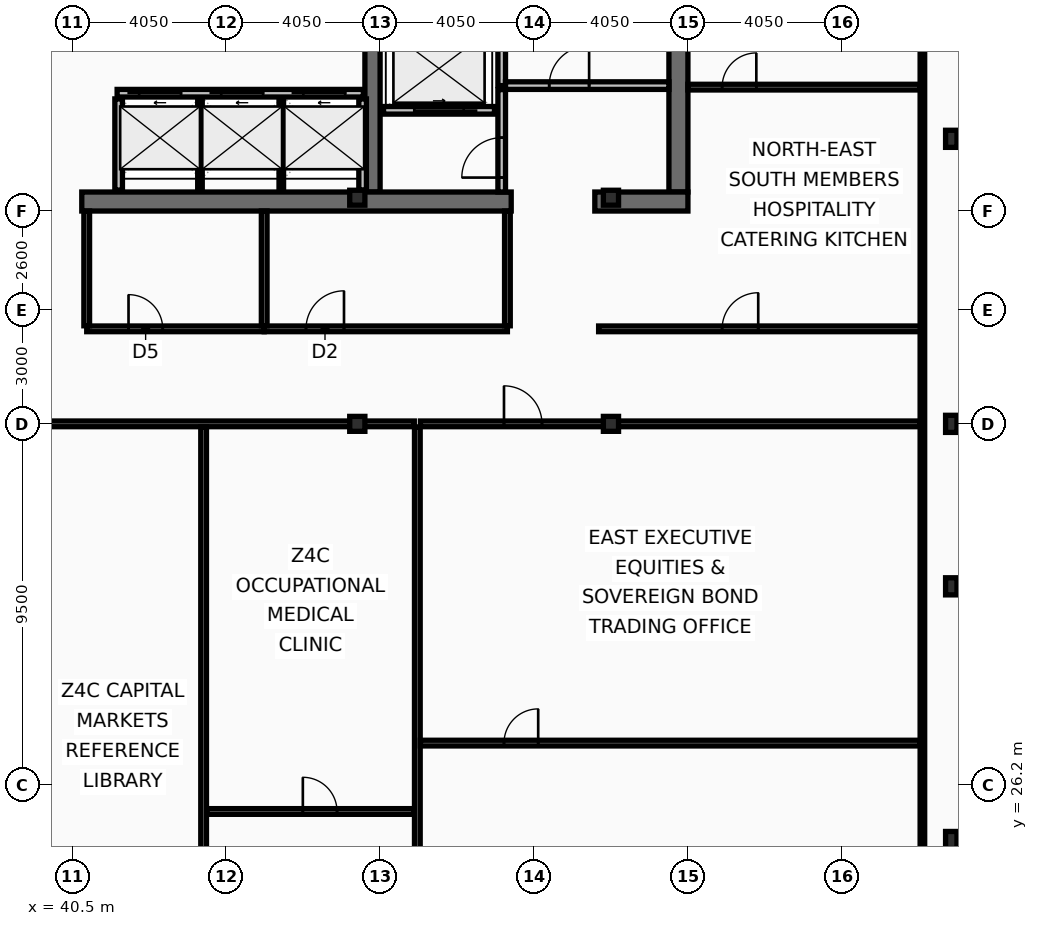
"""IFC4 building model, lengths in metres.
Left out: names, types, materials, properties, quantities, classifications, styles, units other than length and angle.
Written with IfcOpenShell. Run it as: python <this file> out.ifc"""

import sys

from ifc_helpers import new_model, si_unit, direction, frame, frame_2d, origin, origin_2d, place, context, subcontext, project, spatial, rectangle, i_section, extrude, element, fill, save


model = new_model("IFC4")
c1 = context("Model", 3, precision=1e-05, world=origin(), true_north=direction((0.0, 1.0)))
c2 = subcontext(c1, "Body", "Model", "MODEL_VIEW")
j1 = project(units=[si_unit("LENGTHUNIT", "METRE"), si_unit("PLANEANGLEUNIT", "RADIAN")], contexts=[c1])
p1 = place(None, origin())
s1 = spatial("IfcSite", under=j1, at=p1, CompositionType="ELEMENT")
p2 = place(p1, origin())
s2 = spatial("IfcBuilding", under=s1, at=p2, CompositionType="ELEMENT")
p3 = place(p2, frame((0.0, 0.0, 277.0)))
s3 = spatial("IfcBuildingStorey", under=s2, at=p3, CompositionType="ELEMENT", Elevation=277.0)
p4 = place(p3, frame((56.45, 53.2, 0.0), z_axis=(0.0, 0.0, 1.0), x_axis=(0.0, -1.0, 0.0)))
e1 = element("IfcWall", 1, at=p4, inside=s3, PredefinedType="SHEAR", context=c2, shape_type="SweptSolid", body=[
    extrude(rectangle(XDim=11.4, YDim=0.5, at=frame_2d((5.7, 0.0))), origin(), (0.0, 0.0, 1.0), 3.44),
])
p5 = place(p3, frame((48.4, 41.8, 0.0), z_axis=(0.0, 0.0, 1.0), x_axis=(0.0, 1.0, 0.0)))
e2 = element("IfcWall", 2, at=p5, inside=s3, PredefinedType="SHEAR", context=c2, shape_type="SweptSolid", body=[
    extrude(rectangle(XDim=11.4, YDim=0.4, at=frame_2d((5.7, 0.0))), origin(), (0.0, 0.0, 1.0), 3.44),
])
p6 = place(p3, frame((52.05, 41.55, 0.0), z_axis=(0.0, 0.0, 1.0), x_axis=(-1.0, 0.0, 0.0)))
e3 = element("IfcWall", 3, at=p6, inside=s3, PredefinedType="SHEAR", context=c2, shape_type="SweptSolid", body=[
    extrude(rectangle(XDim=11.3, YDim=0.5, at=frame_2d((5.65, 0.0))), origin(), (0.0, 0.0, 1.0), 3.44),
])
p7 = place(p3, frame((56.7, 41.55, 0.0), z_axis=(0.0, 0.0, 1.0), x_axis=(-1.0, 0.0, 0.0)))
e4 = element("IfcWall", 4, at=p7, inside=s3, PredefinedType="SHEAR", context=c2, shape_type="SweptSolid", body=[
    extrude(rectangle(XDim=2.45, YDim=0.5, at=frame_2d((1.225, 0.0))), origin(), (0.0, 0.0, 1.0), 3.44),
])
for number, where, z_axis, x_axis in (
    (5, (63.63, 24.75, 0.0), (0.0, 0.0, 1.0), (1.0, 0.0, 0.0)),
    (6, (63.63, 31.425, 0.0), (0.0, 0.0, 1.0), (1.0, 0.0, 0.0)),
    (7, (63.63, 35.7, 0.0), (0.0, 0.0, 1.0), (1.0, 0.0, 0.0)),
    (8, (63.63, 43.2, 0.0), (0.0, 0.0, 1.0), (1.0, 0.0, 0.0)),
):
    element("IfcColumn", number, at=place(p3, frame(where, z_axis=z_axis, x_axis=x_axis)), inside=s3, PredefinedType="COLUMN", context=c2, shape_type="SweptSolid", body=[
        extrude(i_section(OverallWidth=0.3, OverallDepth=0.45, WebThickness=0.014, FlangeThickness=0.026, at=origin_2d()), origin(), (0.0, 0.0, 1.0), 3.6),
    ])
for number, where, z_axis, x_axis in (
    (9, (48.0, 35.7, 0.0), (0.0, 0.0, 1.0), (1.0, 0.0, 0.0)),
    (10, (48.0, 41.65, 0.0), (0.0, 0.0, 1.0), (1.0, 0.0, 0.0)),
    (11, (54.675, 35.7, 0.0), (0.0, 0.0, 1.0), (1.0, 0.0, 0.0)),
    (12, (54.675, 41.65, 0.0), (0.0, 0.0, 1.0), (1.0, 0.0, 0.0)),
):
    element("IfcColumn", number, at=place(p3, frame(where, z_axis=z_axis, x_axis=x_axis)), inside=s3, PredefinedType="COLUMN", context=c2, shape_type="SweptSolid", body=[
        extrude(i_section(OverallWidth=0.399, OverallDepth=0.393, WebThickness=0.023, FlangeThickness=0.037, at=origin_2d()), origin(), (0.0, 0.0, 1.0), 3.6),
    ])
p8 = place(p3, frame((41.68, 44.4, 0.0), z_axis=(0.0, 0.0, 1.0), x_axis=(1.0, 0.0, 0.0)))
e13 = element("IfcWall", 13, at=p8, inside=s3, PredefinedType="PARTITIONING", context=c2, shape_type="SweptSolid", body=[
    extrude(rectangle(XDim=6.48, YDim=0.2, at=frame_2d((3.24, 0.0))), origin(), (0.0, 0.0, 1.0), 3.44),
])
p9 = place(p8, frame((0.58, 0.0, 0.0)))
e14 = element("IfcOpeningElement", 14, at=p9, cuts=e13, PredefinedType="OPENING", context=c2, shape_type="SweptSolid", body=[
    extrude(rectangle(XDim=1.1, YDim=2.18, at=frame_2d((0.55, 1.09))), frame((0.0, 0.11, 0.0), z_axis=(0.0, -1.0, 0.0), x_axis=(1.0, 0.0, 0.0)), (0.0, 0.0, 1.0), 0.22),
])
p10 = place(p8, frame((2.74, 0.0, 0.0)))
e15 = element("IfcOpeningElement", 15, at=p10, cuts=e13, PredefinedType="OPENING", context=c2, shape_type="SweptSolid", body=[
    extrude(rectangle(XDim=1.1, YDim=2.18, at=frame_2d((0.55, 1.09))), frame((0.0, 0.11, 0.0), z_axis=(0.0, -1.0, 0.0), x_axis=(1.0, 0.0, 0.0)), (0.0, 0.0, 1.0), 0.22),
])
p11 = place(p8, frame((4.9, 0.0, 0.0)))
e16 = element("IfcOpeningElement", 16, at=p11, cuts=e13, PredefinedType="OPENING", context=c2, shape_type="SweptSolid", body=[
    extrude(rectangle(XDim=1.1, YDim=2.18, at=frame_2d((0.55, 1.09))), frame((0.0, 0.11, 0.0), z_axis=(0.0, -1.0, 0.0), x_axis=(1.0, 0.0, 0.0)), (0.0, 0.0, 1.0), 0.22),
])
p12 = place(p3, frame((51.61, 43.95, 0.0), z_axis=(0.0, 0.0, 1.0), x_axis=(-1.0, 0.0, 0.0)))
e17 = element("IfcWall", 17, at=p12, inside=s3, PredefinedType="PARTITIONING", context=c2, shape_type="SweptSolid", body=[
    extrude(rectangle(XDim=2.92, YDim=0.2, at=frame_2d((1.46, 0.0))), origin(), (0.0, 0.0, 1.0), 3.44),
])
p13 = place(p12, frame((0.81, 0.0, 0.0)))
e18 = element("IfcOpeningElement", 18, at=p13, cuts=e17, PredefinedType="OPENING", context=c2, shape_type="SweptSolid", body=[
    extrude(rectangle(XDim=1.3, YDim=2.18, at=frame_2d((0.65, 1.09))), frame((0.0, 0.11, 0.0), z_axis=(0.0, -1.0, 0.0), x_axis=(1.0, 0.0, 0.0)), (0.0, 0.0, 1.0), 0.22),
])
p14 = place(p3, frame((51.8, 44.6, 0.0), z_axis=(0.0, 0.0, 1.0), x_axis=(0.0, 1.0, 0.0)))
e19 = element("IfcWall", 19, at=p14, inside=s3, PredefinedType="PARTITIONING", context=c2, shape_type="SweptSolid", body=[
    extrude(rectangle(XDim=4.3, YDim=0.2, at=frame_2d((2.15, 0.0))), origin(), (0.0, 0.0, 1.0), 3.44),
])
p15 = place(p3, frame((51.9, 44.6, 0.0), z_axis=(0.0, 0.0, 1.0), x_axis=(1.0, 0.0, 0.0)))
e20 = element("IfcWall", 20, at=p15, inside=s3, PredefinedType="PARTITIONING", context=c2, shape_type="SweptSolid", body=[
    extrude(rectangle(XDim=4.3, YDim=0.2, at=frame_2d((2.15, 0.0))), origin(), (0.0, 0.0, 1.0), 3.44),
])
p16 = place(p15, frame((1.15, 0.0, 0.0)))
e21 = element("IfcOpeningElement", 21, at=p16, cuts=e20, PredefinedType="OPENING", context=c2, shape_type="SweptSolid", body=[
    extrude(rectangle(XDim=1.05, YDim=2.15, at=frame_2d((0.525, 1.075))), frame((0.0, 0.11, 0.0), z_axis=(0.0, -1.0, 0.0), x_axis=(1.0, 0.0, 0.0)), (0.0, 0.0, 1.0), 0.22),
])
p17 = place(p3, frame((51.8, 41.8, 0.0), z_axis=(0.0, 0.0, 1.0), x_axis=(0.0, 1.0, 0.0)))
e22 = element("IfcWall", 22, at=p17, inside=s3, PredefinedType="PARTITIONING", context=c2, shape_type="SweptSolid", body=[
    extrude(rectangle(XDim=2.695, YDim=0.2, at=frame_2d((1.348, 0.0))), origin(), (0.0, 0.0, 1.0), 3.44),
])
p18 = place(p17, frame((0.38, 0.0, 0.0)))
e23 = element("IfcOpeningElement", 23, at=p18, cuts=e22, PredefinedType="OPENING", context=c2, shape_type="SweptSolid", body=[
    extrude(rectangle(XDim=1.05, YDim=2.15, at=frame_2d((0.525, 1.075))), frame((0.0, 0.11, 0.0), z_axis=(0.0, -1.0, 0.0), x_axis=(1.0, 0.0, 0.0)), (0.0, 0.0, 1.0), 0.22),
])
for number, where, z_axis, x_axis in (
    (24, (41.72, 41.85, 0.0), (0.0, 0.0, 1.0), (0.0, 1.0, 0.0)),
    (25, (48.14, 41.85, 0.0), (0.0, 0.0, 1.0), (0.0, 1.0, 0.0)),
):
    element("IfcWall", number, at=place(p3, frame(where, z_axis=z_axis, x_axis=x_axis)), inside=s3, PredefinedType="PARTITIONING", context=c2, shape_type="SweptSolid", body=[
        extrude(rectangle(XDim=2.4, YDim=0.2, at=frame_2d((1.2, 0.0))), origin(), (0.0, 0.0, 1.0), 3.44),
    ])
for number, where, z_axis, x_axis in (
    (26, (43.86, 41.85, 0.0), (0.0, 0.0, 1.0), (0.0, 1.0, 0.0)),
    (27, (46.0, 41.85, 0.0), (0.0, 0.0, 1.0), (0.0, 1.0, 0.0)),
):
    element("IfcWall", number, at=place(p3, frame(where, z_axis=z_axis, x_axis=x_axis)), inside=s3, PredefinedType="PARTITIONING", context=c2, shape_type="SweptSolid", body=[
        extrude(rectangle(XDim=2.4, YDim=0.12, at=frame_2d((1.2, 0.0))), origin(), (0.0, 0.0, 1.0), 3.44),
    ])
p19 = place(p3, frame((40.88, 38.2, 0.0), z_axis=(0.0, 0.0, 1.0), x_axis=(1.0, 0.0, 0.0)))
e28 = element("IfcWall", 28, at=p19, inside=s3, PredefinedType="PARTITIONING", context=c2, shape_type="SweptSolid", body=[
    extrude(rectangle(XDim=4.67, YDim=0.15, at=frame_2d((2.335, 0.0))), origin(), (0.0, 0.0, 1.0), 2.78),
])
p20 = place(p19, frame((1.1, 0.0, 0.0)))
e29 = element("IfcOpeningElement", 29, at=p20, cuts=e28, PredefinedType="OPENING", context=c2, shape_type="SweptSolid", body=[
    extrude(rectangle(XDim=0.9, YDim=2.05, at=frame_2d((0.45, 1.025))), frame((0.0, 0.085, 0.0), z_axis=(0.0, -1.0, 0.0), x_axis=(1.0, 0.0, 0.0)), (0.0, 0.0, 1.0), 0.17),
])
p21 = place(p3, frame((45.55, 38.2, 0.0), z_axis=(0.0, 0.0, 1.0), x_axis=(1.0, 0.0, 0.0)))
e30 = element("IfcWall", 30, at=p21, inside=s3, PredefinedType="PARTITIONING", context=c2, shape_type="SweptSolid", body=[
    extrude(rectangle(XDim=6.4, YDim=0.15, at=frame_2d((3.2, 0.0))), origin(), (0.0, 0.0, 1.0), 2.78),
])
p22 = place(p21, frame((1.1, 0.0, 0.0)))
e31 = element("IfcOpeningElement", 31, at=p22, cuts=e30, PredefinedType="OPENING", context=c2, shape_type="SweptSolid", body=[
    extrude(rectangle(XDim=1.0, YDim=2.05, at=frame_2d((0.5, 1.025))), frame((0.0, 0.085, 0.0), z_axis=(0.0, -1.0, 0.0), x_axis=(1.0, 0.0, 0.0)), (0.0, 0.0, 1.0), 0.17),
])
for number, where, z_axis, x_axis in (
    (32, (40.88, 38.28, 0.0), (0.0, 0.0, 1.0), (0.0, 1.0, 0.0)),
    (33, (45.55, 38.28, 0.0), (0.0, 0.0, 1.0), (0.0, 1.0, 0.0)),
    (34, (51.95, 38.28, 0.0), (0.0, 0.0, 1.0), (0.0, 1.0, 0.0)),
):
    element("IfcWall", number, at=place(p3, frame(where, z_axis=z_axis, x_axis=x_axis)), inside=s3, PredefinedType="PARTITIONING", context=c2, shape_type="SweptSolid", body=[
        extrude(rectangle(XDim=3.02, YDim=0.15, at=frame_2d((1.51, 0.0))), origin(), (0.0, 0.0, 1.0), 3.44),
    ])
p23 = place(p3, frame((54.35, 38.2, 0.0), z_axis=(0.0, 0.0, 1.0), x_axis=(1.0, 0.0, 0.0)))
e35 = element("IfcWall", 35, at=p23, inside=s3, PredefinedType="PARTITIONING", context=c2, shape_type="SweptSolid", body=[
    extrude(rectangle(XDim=8.52, YDim=0.15, at=frame_2d((4.26, 0.0))), origin(), (0.0, 0.0, 1.0), 2.78),
])
p24 = place(p23, frame((3.25, 0.0, 0.0)))
e36 = element("IfcOpeningElement", 36, at=p24, cuts=e35, PredefinedType="OPENING", context=c2, shape_type="SweptSolid", body=[
    extrude(rectangle(XDim=0.95, YDim=2.05, at=frame_2d((0.475, 1.025))), frame((0.0, 0.085, 0.0), z_axis=(0.0, -1.0, 0.0), x_axis=(1.0, 0.0, 0.0)), (0.0, 0.0, 1.0), 0.17),
])
p25 = place(p3, frame((56.7, 44.56, 0.0), z_axis=(0.0, 0.0, 1.0), x_axis=(1.0, 0.0, 0.0)))
e37 = element("IfcWall", 37, at=p25, inside=s3, PredefinedType="PARTITIONING", context=c2, shape_type="SweptSolid", body=[
    extrude(rectangle(XDim=6.105, YDim=0.15, at=frame_2d((3.052, 0.0))), origin(), (0.0, 0.0, 1.0), 2.88),
])
p26 = place(p25, frame((0.9, 0.0, 0.0)))
e38 = element("IfcOpeningElement", 38, at=p26, cuts=e37, PredefinedType="OPENING", context=c2, shape_type="SweptSolid", body=[
    extrude(rectangle(XDim=0.9, YDim=2.05, at=frame_2d((0.45, 1.025))), frame((0.0, 0.085, 0.0), z_axis=(0.0, -1.0, 0.0), x_axis=(1.0, 0.0, 0.0)), (0.0, 0.0, 1.0), 0.17),
])
p27 = place(p3, frame((49.58, 10.665, 0.0), z_axis=(0.0, 0.0, 1.0), x_axis=(0.0, 1.0, 0.0)))
e39 = element("IfcWall", 39, at=p27, inside=s3, PredefinedType="PARTITIONING", context=c2, shape_type="SweptSolid", body=[
    extrude(rectangle(XDim=24.955, YDim=0.15, at=frame_2d((12.478, 0.0))), origin(), (0.0, 0.0, 1.0), 3.03),
])
p28 = place(p27, frame((3.2, 0.0, 0.0)))
e40 = element("IfcOpeningElement", 40, at=p28, cuts=e39, PredefinedType="OPENING", context=c2, shape_type="SweptSolid", body=[
    extrude(rectangle(XDim=1.1, YDim=2.1, at=frame_2d((0.55, 1.05))), frame((0.0, 0.085, 0.0), z_axis=(0.0, -1.0, 0.0), x_axis=(1.0, 0.0, 0.0)), (0.0, 0.0, 1.0), 0.17),
])
p29 = place(p3, frame((24.48, 35.7, 0.0), z_axis=(0.0, 0.0, 1.0), x_axis=(1.0, 0.0, 0.0)))
e41 = element("IfcWall", 41, at=p29, inside=s3, PredefinedType="PARTITIONING", context=c2, shape_type="SweptSolid", body=[
    extrude(rectangle(XDim=25.02, YDim=0.15, at=frame_2d((12.51, 0.0))), origin(), (0.0, 0.0, 1.0), 2.78),
])
p30 = place(p3, frame((49.66, 35.7, 0.0), z_axis=(0.0, 0.0, 1.0), x_axis=(1.0, 0.0, 0.0)))
e42 = element("IfcWall", 42, at=p30, inside=s3, PredefinedType="PARTITIONING", context=c2, shape_type="SweptSolid", body=[
    extrude(rectangle(XDim=13.145, YDim=0.15, at=frame_2d((6.573, 0.0))), origin(), (0.0, 0.0, 1.0), 2.78),
])
p31 = place(p30, frame((2.2, 0.0, 0.0)))
e43 = element("IfcOpeningElement", 43, at=p31, cuts=e42, PredefinedType="OPENING", context=c2, shape_type="SweptSolid", body=[
    extrude(rectangle(XDim=1.0, YDim=2.05, at=frame_2d((0.5, 1.025))), frame((0.0, 0.085, 0.0), z_axis=(0.0, -1.0, 0.0), x_axis=(1.0, 0.0, 0.0)), (0.0, 0.0, 1.0), 0.17),
])
p32 = place(p3, frame((49.66, 27.3, 0.0), z_axis=(0.0, 0.0, 1.0), x_axis=(1.0, 0.0, 0.0)))
e44 = element("IfcWall", 44, at=p32, inside=s3, PredefinedType="PARTITIONING", context=c2, shape_type="SweptSolid", body=[
    extrude(rectangle(XDim=13.145, YDim=0.15, at=frame_2d((6.573, 0.0))), origin(), (0.0, 0.0, 1.0), 2.78),
])
p33 = place(p32, frame((2.2, 0.0, 0.0)))
e45 = element("IfcOpeningElement", 45, at=p33, cuts=e44, PredefinedType="OPENING", context=c2, shape_type="SweptSolid", body=[
    extrude(rectangle(XDim=0.9, YDim=2.05, at=frame_2d((0.45, 1.025))), frame((0.0, 0.085, 0.0), z_axis=(0.0, -1.0, 0.0), x_axis=(1.0, 0.0, 0.0)), (0.0, 0.0, 1.0), 0.17),
])
p34 = place(p3, frame((43.956, 18.135, 0.0), z_axis=(0.0, 0.0, 1.0), x_axis=(0.0, 1.0, 0.0)))
e46 = element("IfcWall", 46, at=p34, inside=s3, PredefinedType="PARTITIONING", context=c2, shape_type="SweptSolid", body=[
    extrude(rectangle(XDim=17.485, YDim=0.15, at=frame_2d((8.743, 0.0))), origin(), (0.0, 0.0, 1.0), 3.03),
])
p35 = place(p3, frame((44.036, 25.501, 0.0), z_axis=(0.0, 0.0, 1.0), x_axis=(1.0, 0.0, 0.0)))
e47 = element("IfcWall", 47, at=p35, inside=s3, PredefinedType="PARTITIONING", context=c2, shape_type="SweptSolid", body=[
    extrude(rectangle(XDim=5.464, YDim=0.15, at=frame_2d((2.732, 0.0))), origin(), (0.0, 0.0, 1.0), 2.78),
])
p36 = place(p35, frame((2.531, 0.0, 0.0)))
e48 = element("IfcOpeningElement", 48, at=p36, cuts=e47, PredefinedType="OPENING", context=c2, shape_type="SweptSolid", body=[
    extrude(rectangle(XDim=0.9, YDim=2.05, at=frame_2d((0.45, 1.025))), frame((0.0, 0.085, 0.0), z_axis=(0.0, -1.0, 0.0), x_axis=(1.0, 0.0, 0.0)), (0.0, 0.0, 1.0), 0.17),
])
p37 = place(p3, frame((62.87, 10.665, 0.0), z_axis=(0.0, 0.0, 1.0), x_axis=(0.0, 1.0, 0.0)))
e49 = element("IfcWall", 49, at=p37, inside=s3, PredefinedType="PARTITIONING", context=c2, shape_type="SweptSolid", body=[
    extrude(rectangle(XDim=42.11, YDim=0.12, at=frame_2d((21.055, 0.0))), origin(), (0.0, 0.0, 1.0), 2.78),
])
p38 = place(p9, origin())
e50 = element("IfcDoor", 50, at=p38, inside=s3, OperationType="SLIDING_TO_LEFT", PredefinedType="DOOR", context=c2, shape_type="SweptSolid", body=[
    extrude(rectangle(XDim=1.1, YDim=2.18, at=frame_2d((0.55, 1.09))), frame((0.0, 0.025, 0.0), z_axis=(0.0, -1.0, 0.0), x_axis=(1.0, 0.0, 0.0)), (0.0, 0.0, 1.0), 0.05),
])
fill(e14, e50)
p39 = place(p10, origin())
e51 = element("IfcDoor", 51, at=p39, inside=s3, OperationType="SLIDING_TO_LEFT", PredefinedType="DOOR", context=c2, shape_type="SweptSolid", body=[
    extrude(rectangle(XDim=1.1, YDim=2.18, at=frame_2d((0.55, 1.09))), frame((0.0, 0.025, 0.0), z_axis=(0.0, -1.0, 0.0), x_axis=(1.0, 0.0, 0.0)), (0.0, 0.0, 1.0), 0.05),
])
fill(e15, e51)
p40 = place(p11, origin())
e52 = element("IfcDoor", 52, at=p40, inside=s3, OperationType="SLIDING_TO_LEFT", PredefinedType="DOOR", context=c2, shape_type="SweptSolid", body=[
    extrude(rectangle(XDim=1.1, YDim=2.18, at=frame_2d((0.55, 1.09))), frame((0.0, 0.025, 0.0), z_axis=(0.0, -1.0, 0.0), x_axis=(1.0, 0.0, 0.0)), (0.0, 0.0, 1.0), 0.05),
])
fill(e16, e52)
p41 = place(p13, origin())
e53 = element("IfcDoor", 53, at=p41, inside=s3, OperationType="SLIDING_TO_LEFT", PredefinedType="DOOR", context=c2, shape_type="SweptSolid", body=[
    extrude(rectangle(XDim=1.3, YDim=2.18, at=frame_2d((0.65, 1.09))), frame((0.0, 0.025, 0.0), z_axis=(0.0, -1.0, 0.0), x_axis=(1.0, 0.0, 0.0)), (0.0, 0.0, 1.0), 0.05),
])
fill(e18, e53)
p42 = place(p16, origin())
e54 = element("IfcDoor", 54, at=p42, inside=s3, OperationType="SINGLE_SWING_RIGHT", PredefinedType="DOOR", context=c2, shape_type="SweptSolid", body=[
    extrude(rectangle(XDim=1.05, YDim=2.15, at=frame_2d((0.525, 1.075))), frame((0.0, 0.025, 0.0), z_axis=(0.0, -1.0, 0.0), x_axis=(1.0, 0.0, 0.0)), (0.0, 0.0, 1.0), 0.05),
])
fill(e21, e54)
p43 = place(p18, origin())
e55 = element("IfcDoor", 55, at=p43, inside=s3, OperationType="SINGLE_SWING_LEFT", PredefinedType="DOOR", context=c2, shape_type="SweptSolid", body=[
    extrude(rectangle(XDim=1.05, YDim=2.15, at=frame_2d((0.525, 1.075))), frame((0.0, 0.025, 0.0), z_axis=(0.0, -1.0, 0.0), x_axis=(1.0, 0.0, 0.0)), (0.0, 0.0, 1.0), 0.05),
])
fill(e23, e55)
p44 = place(p20, origin())
e56 = element("IfcDoor", 56, at=p44, inside=s3, OperationType="SINGLE_SWING_LEFT", PredefinedType="DOOR", context=c2, shape_type="SweptSolid", body=[
    extrude(rectangle(XDim=0.9, YDim=2.05, at=frame_2d((0.45, 1.025))), frame((0.0, 0.025, 0.0), z_axis=(0.0, -1.0, 0.0), x_axis=(1.0, 0.0, 0.0)), (0.0, 0.0, 1.0), 0.05),
])
fill(e29, e56)
p45 = place(p22, origin())
e57 = element("IfcDoor", 57, at=p45, inside=s3, OperationType="SINGLE_SWING_RIGHT", PredefinedType="DOOR", context=c2, shape_type="SweptSolid", body=[
    extrude(rectangle(XDim=1.0, YDim=2.05, at=frame_2d((0.5, 1.025))), frame((0.0, 0.025, 0.0), z_axis=(0.0, -1.0, 0.0), x_axis=(1.0, 0.0, 0.0)), (0.0, 0.0, 1.0), 0.05),
])
fill(e31, e57)
p46 = place(p24, origin())
e58 = element("IfcDoor", 58, at=p46, inside=s3, OperationType="SINGLE_SWING_RIGHT", PredefinedType="DOOR", context=c2, shape_type="SweptSolid", body=[
    extrude(rectangle(XDim=0.95, YDim=2.05, at=frame_2d((0.475, 1.025))), frame((0.0, 0.025, 0.0), z_axis=(0.0, -1.0, 0.0), x_axis=(1.0, 0.0, 0.0)), (0.0, 0.0, 1.0), 0.05),
])
fill(e36, e58)
p47 = place(p26, origin())
e59 = element("IfcDoor", 59, at=p47, inside=s3, OperationType="SINGLE_SWING_RIGHT", PredefinedType="DOOR", context=c2, shape_type="SweptSolid", body=[
    extrude(rectangle(XDim=0.9, YDim=2.05, at=frame_2d((0.45, 1.025))), frame((0.0, 0.025, 0.0), z_axis=(0.0, -1.0, 0.0), x_axis=(1.0, 0.0, 0.0)), (0.0, 0.0, 1.0), 0.05),
])
fill(e38, e59)
p48 = place(p31, origin())
e60 = element("IfcDoor", 60, at=p48, inside=s3, OperationType="SINGLE_SWING_LEFT", PredefinedType="DOOR", context=c2, shape_type="SweptSolid", body=[
    extrude(rectangle(XDim=1.0, YDim=2.05, at=frame_2d((0.5, 1.025))), frame((0.0, 0.025, 0.0), z_axis=(0.0, -1.0, 0.0), x_axis=(1.0, 0.0, 0.0)), (0.0, 0.0, 1.0), 0.05),
])
fill(e43, e60)
p49 = place(p33, origin())
e61 = element("IfcDoor", 61, at=p49, inside=s3, OperationType="SINGLE_SWING_RIGHT", PredefinedType="DOOR", context=c2, shape_type="SweptSolid", body=[
    extrude(rectangle(XDim=0.9, YDim=2.05, at=frame_2d((0.45, 1.025))), frame((0.0, 0.025, 0.0), z_axis=(0.0, -1.0, 0.0), x_axis=(1.0, 0.0, 0.0)), (0.0, 0.0, 1.0), 0.05),
])
fill(e45, e61)
p50 = place(p36, origin())
e62 = element("IfcDoor", 62, at=p50, inside=s3, OperationType="SINGLE_SWING_LEFT", PredefinedType="DOOR", context=c2, shape_type="SweptSolid", body=[
    extrude(rectangle(XDim=0.9, YDim=2.05, at=frame_2d((0.45, 1.025))), frame((0.0, 0.025, 0.0), z_axis=(0.0, -1.0, 0.0), x_axis=(1.0, 0.0, 0.0)), (0.0, 0.0, 1.0), 0.05),
])
fill(e48, e62)
save(model, sys.argv[1])
